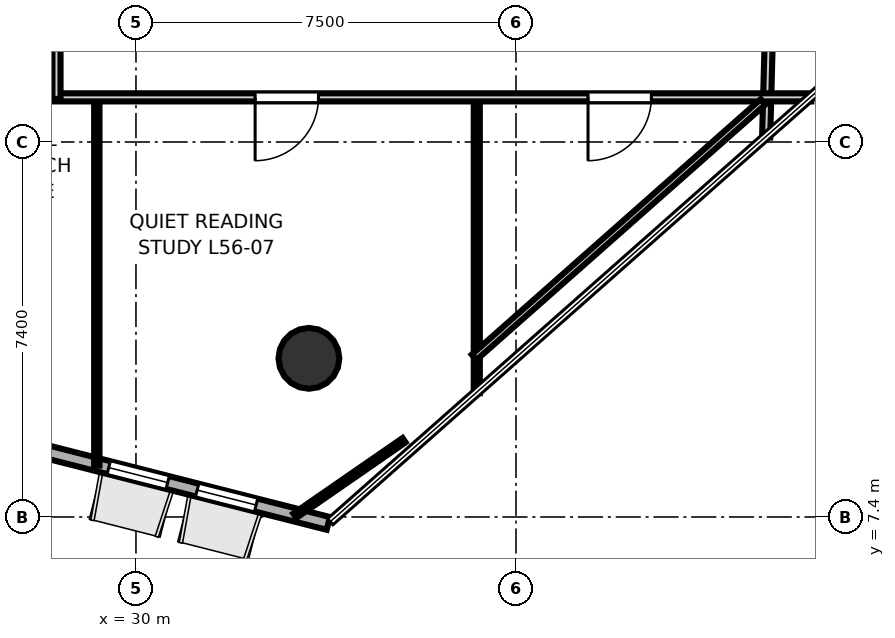
"""IFC4 building model, lengths in metres.
Left out: names, types, materials, properties, quantities, classifications, styles, units other than length and angle.
Written with IfcOpenShell. Run it as: python <this file> out.ifc"""

import sys

from ifc_helpers import new_model, si_unit, direction, frame, frame_2d, origin, origin_2d, place, context, subcontext, project, spatial, rectangle, hollow_circle, extrude, element, fill, save


model = new_model("IFC4")
c1 = context("Model", 3, precision=1e-05, world=origin(), true_north=direction((0.0, 1.0)))
c2 = subcontext(c1, "Body", "Model", "MODEL_VIEW")
j1 = project(units=[si_unit("LENGTHUNIT", "METRE"), si_unit("PLANEANGLEUNIT", "RADIAN")], contexts=[c1])
p1 = place(None, origin())
s1 = spatial("IfcSite", under=j1, at=p1, CompositionType="ELEMENT")
p2 = place(p1, origin())
s2 = spatial("IfcBuilding", under=s1, at=p2, CompositionType="ELEMENT")
p3 = place(p2, frame((0.0, 0.0, 218.8)))
s3 = spatial("IfcBuildingStorey", under=s2, at=p3, CompositionType="ELEMENT", Elevation=218.8)
p4 = place(p3, frame((33.413, 10.531, 0.0), z_axis=(0.0, 0.0, 1.0), x_axis=(1.0, 0.0, 0.0)))
e1 = element("IfcColumn", 1, at=p4, inside=s3, PredefinedType="COLUMN", context=c2, shape_type="SweptSolid", body=[
    extrude(hollow_circle(Radius=0.6, WallThickness=0.03, at=origin_2d()), origin(), (0.0, 0.0, 1.0), 3.7),
])
p5 = place(p3, frame((27.107, 8.974, 0.0), z_axis=(0.0, 0.0, 1.0), x_axis=(0.969158794911, -0.246437071577, 0.0)))
e2 = element("IfcWall", 2, at=p5, inside=s3, PredefinedType="SOLIDWALL", context=c2, shape_type="SweptSolid", body=[
    extrude(rectangle(XDim=6.902, YDim=0.26, at=frame_2d((3.451, 0.0))), origin(), (0.0, 0.0, 1.0), 3.52),
])
p6 = place(p5, frame((2.431, 0.0, 0.9)))
e3 = element("IfcOpeningElement", 3, at=p6, cuts=e2, PredefinedType="OPENING", context=c2, shape_type="SweptSolid", body=[
    extrude(rectangle(XDim=1.2, YDim=2.0, at=frame_2d((0.6, 1.0))), frame((0.0, 0.14, 0.0), z_axis=(0.0, -1.0, 0.0), x_axis=(1.0, 0.0, 0.0)), (0.0, 0.0, 1.0), 0.28),
])
p7 = place(p5, frame((4.231, 0.0, 0.9)))
e4 = element("IfcOpeningElement", 4, at=p7, cuts=e2, PredefinedType="OPENING", context=c2, shape_type="SweptSolid", body=[
    extrude(rectangle(XDim=1.2, YDim=2.0, at=frame_2d((0.6, 1.0))), frame((0.0, 0.14, 0.0), z_axis=(0.0, -1.0, 0.0), x_axis=(1.0, 0.0, 0.0)), (0.0, 0.0, 1.0), 0.28),
])
p8 = place(p3, frame((42.519, 17.981, 0.0), z_axis=(0.0, 0.0, 1.0), x_axis=(-0.026620353414, -0.999645615598, 0.0)))
e5 = element("IfcWall", 5, at=p8, inside=s3, PredefinedType="PARTITIONING", context=c2, shape_type="SweptSolid", body=[
    extrude(rectangle(XDim=3.091, YDim=0.16, at=frame_2d((1.545, 0.0))), origin(), (0.0, 0.0, 1.0), 2.84),
])
p9 = place(p3, frame((43.328, 15.681, 0.0), z_axis=(0.0, 0.0, 1.0), x_axis=(-1.0, 0.0, 0.0)))
e6 = element("IfcWall", 6, at=p9, inside=s3, PredefinedType="PARTITIONING", context=c2, shape_type="SweptSolid", body=[
    extrude(rectangle(XDim=14.928, YDim=0.16, at=frame_2d((7.464, 0.0))), origin(), (0.0, 0.0, 1.0), 2.84),
])
p10 = place(p9, frame((3.157, 0.0, 0.0)))
e7 = element("IfcOpeningElement", 7, at=p10, cuts=e6, PredefinedType="OPENING", context=c2, shape_type="SweptSolid", body=[
    extrude(rectangle(XDim=1.25, YDim=2.2, at=frame_2d((0.625, 1.1))), frame((0.0, 0.09, 0.0), z_axis=(0.0, -1.0, 0.0), x_axis=(1.0, 0.0, 0.0)), (0.0, 0.0, 1.0), 0.18),
])
p11 = place(p9, frame((9.727, 0.0, 0.0)))
e8 = element("IfcOpeningElement", 8, at=p11, cuts=e6, PredefinedType="OPENING", context=c2, shape_type="SweptSolid", body=[
    extrude(rectangle(XDim=1.25, YDim=2.2, at=frame_2d((0.625, 1.1))), frame((0.0, 0.09, 0.0), z_axis=(0.0, -1.0, 0.0), x_axis=(1.0, 0.0, 0.0)), (0.0, 0.0, 1.0), 0.18),
])
p12 = place(p3, frame((28.431, 15.65, 0.0), z_axis=(0.0, 0.0, 1.0), x_axis=(0.0, 1.0, 0.0)))
e9 = element("IfcWall", 9, at=p12, inside=s3, PredefinedType="PARTITIONING", context=c2, shape_type="SweptSolid", body=[
    extrude(rectangle(XDim=2.4, YDim=0.16, at=frame_2d((1.2, 0.0))), origin(), (0.0, 0.0, 1.0), 2.84),
])
p13 = place(p3, frame((29.227, 15.57, 0.0), z_axis=(0.0, 0.0, 1.0), x_axis=(0.0, -1.0, 0.0)))
e10 = element("IfcWall", 10, at=p13, inside=s3, PredefinedType="PARTITIONING", context=c2, shape_type="SweptSolid", body=[
    extrude(rectangle(XDim=7.155, YDim=0.105, at=frame_2d((3.578, 0.0))), origin(), (0.0, 0.0, 1.0), 2.84),
])
p14 = place(p3, frame((36.726, 9.843, 0.0), z_axis=(0.0, 0.0, 1.0), x_axis=(0.0, 1.0, 0.0)))
e11 = element("IfcWall", 11, at=p14, inside=s3, PredefinedType="PARTITIONING", context=c2, shape_type="SweptSolid", body=[
    extrude(rectangle(XDim=5.727, YDim=0.12, at=frame_2d((2.863, 0.0))), origin(), (0.0, 0.0, 1.0), 2.84),
])
p15 = place(p3, frame((42.377, 15.593, 0.0), z_axis=(0.0, 0.0, 1.0), x_axis=(-0.749252451683, -0.662284503553, 0.0)))
e12 = element("IfcWall", 12, at=p15, inside=s3, PredefinedType="PARTITIONING", context=c2, shape_type="SweptSolid", body=[
    extrude(rectangle(XDim=7.61, YDim=0.14, at=frame_2d((3.805, 0.0))), origin(), (0.0, 0.0, 1.0), 2.84),
])
p16 = place(p3, frame((35.291, 8.915, 0.0), z_axis=(0.0, 0.0, 1.0), x_axis=(-0.822547385302, -0.56869657897, 0.0)))
e13 = element("IfcWall", 13, at=p16, inside=s3, PredefinedType="PARTITIONING", context=c2, shape_type="SweptSolid", body=[
    extrude(rectangle(XDim=2.622, YDim=0.105, at=frame_2d((1.311, 0.0))), origin(), (0.0, 0.0, 1.0), 2.84),
])
p17 = place(p10, origin())
e14 = element("IfcDoor", 14, at=p17, inside=s3, OperationType="SINGLE_SWING_RIGHT", PredefinedType="DOOR", context=c2, shape_type="SweptSolid", body=[
    extrude(rectangle(XDim=1.25, YDim=2.2, at=frame_2d((0.625, 1.1))), frame((0.0, 0.025, 0.0), z_axis=(0.0, -1.0, 0.0), x_axis=(1.0, 0.0, 0.0)), (0.0, 0.0, 1.0), 0.05),
])
fill(e7, e14)
p18 = place(p11, origin())
e15 = element("IfcDoor", 15, at=p18, inside=s3, OperationType="SINGLE_SWING_RIGHT", PredefinedType="DOOR", context=c2, shape_type="SweptSolid", body=[
    extrude(rectangle(XDim=1.25, YDim=2.2, at=frame_2d((0.625, 1.1))), frame((0.0, 0.025, 0.0), z_axis=(0.0, -1.0, 0.0), x_axis=(1.0, 0.0, 0.0)), (0.0, 0.0, 1.0), 0.05),
])
fill(e8, e15)
p19 = place(p6, origin())
e16 = element("IfcWindow", 16, at=p19, inside=s3, PartitioningType="SINGLE_PANEL", PredefinedType="WINDOW", context=c2, shape_type="SweptSolid", body=[
    extrude(rectangle(XDim=1.2, YDim=2.0, at=frame_2d((0.6, 1.0))), frame((0.0, 0.03, 0.0), z_axis=(0.0, -1.0, 0.0), x_axis=(1.0, 0.0, 0.0)), (0.0, 0.0, 1.0), 0.06),
])
fill(e3, e16)
p20 = place(p7, origin())
e17 = element("IfcWindow", 17, at=p20, inside=s3, PartitioningType="SINGLE_PANEL", PredefinedType="WINDOW", context=c2, shape_type="SweptSolid", body=[
    extrude(rectangle(XDim=1.2, YDim=2.0, at=frame_2d((0.6, 1.0))), frame((0.0, 0.03, 0.0), z_axis=(0.0, -1.0, 0.0), x_axis=(1.0, 0.0, 0.0)), (0.0, 0.0, 1.0), 0.06),
])
fill(e4, e17)
save(model, sys.argv[1])
